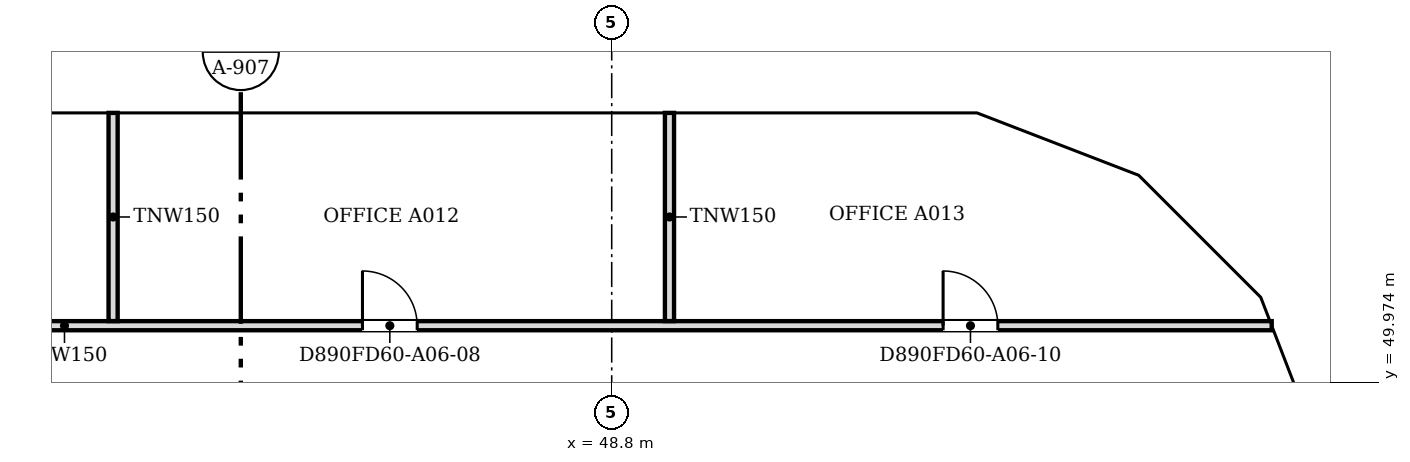
"""IFC4 building model, lengths in metres.
Left out: names, types, materials, properties, quantities, classifications, styles, units other than length and angle.
Written with IfcOpenShell. Run it as: python <this file> out.ifc"""

import sys

from ifc_helpers import new_model, si_unit, direction, frame, frame_2d, origin, place, context, subcontext, project, spatial, polyline, rectangle, outline, extrude, faceted_brep, source, transform, mapped, element, fill, save


model = new_model("IFC4")
c1 = context("Model", 3, precision=1e-05, world=origin(), true_north=direction((0.0, 1.0)))
c2 = subcontext(c1, "Body", "Model", "MODEL_VIEW")
j1 = project(units=[si_unit("LENGTHUNIT", "METRE"), si_unit("PLANEANGLEUNIT", "RADIAN")], contexts=[c1])
p1 = place(None, origin())
s1 = spatial("IfcSite", under=j1, at=p1, CompositionType="ELEMENT")
p2 = place(p1, origin())
s2 = spatial("IfcBuilding", under=s1, at=p2, CompositionType="ELEMENT")
p3 = place(p2, frame((0.0, 0.0, 68.6)))
s3 = spatial("IfcBuildingStorey", under=s2, at=p3, CompositionType="ELEMENT", Elevation=68.6)
m1 = source(origin(), c2, "Body", "Brep", [
    faceted_brep([(3.003, -0.25, 3.731), (2.95, -0.25, 3.8), (0.0, -0.25, 0.0), (3.003, -0.25, 0.0), (0.047, 0.25, 0.06), (2.898, 0.25, 3.732), (2.898, 0.25, 0.0), (0.047, 0.25, 0.0), (2.95, 0.0, 3.8), (0.0, 0.0, 0.0)], [[[0, 1, 2, 3]], [[4, 5, 6, 7]], [[8, 1, 0]], [[5, 4, 9, 2, 1, 8]], [[7, 6, 3, 2, 9]], [[7, 9, 4]], [[3, 6, 5, 8, 0]]]),
])
p4 = place(p3, frame((60.75, 48.753, 0.0), z_axis=(0.0, 0.0, 1.0), x_axis=(-0.35992665181, 0.932980602862, 0.0)))
e1 = element("IfcWall", 1, at=p4, inside=s3, PredefinedType="SOLIDWALL", context=c2, shape_type="MappedRepresentation", body=[
    mapped(m1, transform((0.0, 0.0, 0.0), scale=1.0)),
])
m2 = source(origin(), c2, "Body", "SweptSolid", [
    extrude(outline(polyline([(2.75, 3.135), (0.511, 0.25), (2.75, 0.25), (2.75, 3.135)])), frame((0.0, 0.26, 0.0), z_axis=(0.0, -1.0, 0.0), x_axis=(1.0, 0.0, 0.0)), (0.0, 0.0, 1.0), 0.52),
])
p5 = place(p4, origin())
e2 = element("IfcOpeningElement", 2, at=p5, cuts=e1, PredefinedType="OPENING", context=c2, shape_type="MappedRepresentation", body=[
    mapped(m2, transform((0.0, 0.0, 0.0), scale=1.0)),
])
m3 = source(origin(), c2, "Body", "Brep", [
    faceted_brep([(2.997, -0.25, 0.0), (0.053, -0.25, 3.8), (0.0, -0.25, 3.732), (0.0, -0.25, 0.0), (0.106, 0.25, 3.731), (2.944, 0.25, 0.068), (2.944, 0.25, 0.0), (0.106, 0.25, 0.0), (0.053, 0.0, 3.8), (2.997, 0.0, 0.0)], [[[0, 1, 2, 3]], [[4, 5, 6, 7]], [[5, 4, 8, 1, 0, 9]], [[2, 1, 8]], [[7, 6, 9, 0, 3]], [[7, 3, 2, 8, 4]], [[9, 6, 5]]]),
])
p6 = place(p3, frame((59.726, 51.469, 0.0), z_axis=(0.0, 0.0, 1.0), x_axis=(-0.707106781187, 0.707106781187, 0.0)))
e3 = element("IfcWall", 3, at=p6, inside=s3, PredefinedType="SOLIDWALL", context=c2, shape_type="MappedRepresentation", body=[
    mapped(m3, transform((0.0, 0.0, 0.0), scale=1.0)),
])
m4 = source(origin(), c2, "Body", "SweptSolid", [
    extrude(outline(polyline([(2.487, 0.25), (0.253, 3.134), (0.253, 0.25), (2.487, 0.25)])), frame((0.0, 0.26, 0.0), z_axis=(0.0, -1.0, 0.0), x_axis=(1.0, 0.0, 0.0)), (0.0, 0.0, 1.0), 0.52),
])
p7 = place(p6, origin())
e4 = element("IfcOpeningElement", 4, at=p7, cuts=e3, PredefinedType="OPENING", context=c2, shape_type="MappedRepresentation", body=[
    mapped(m4, transform((0.0, 0.0, 0.0), scale=1.0)),
])
m5 = source(origin(), c2, "Body", "Brep", [
    faceted_brep([(2.997, -0.25, 3.741), (2.95, -0.25, 3.8), (0.0, -0.25, 0.0), (2.997, -0.25, 0.0), (0.053, 0.25, 0.068), (2.904, 0.25, 3.74), (2.904, 0.25, 0.0), (0.053, 0.25, 0.0), (2.95, 0.0, 3.8), (0.0, 0.0, 0.0)], [[[0, 1, 2, 3]], [[4, 5, 6, 7]], [[8, 1, 0]], [[5, 4, 9, 2, 1, 8]], [[7, 6, 3, 2, 9]], [[7, 9, 4]], [[3, 6, 5, 8, 0]]]),
])
p8 = place(p3, frame((57.606, 53.588, 0.0), z_axis=(0.0, 0.0, 1.0), x_axis=(-0.932990326376, 0.359901446078, 0.0)))
e5 = element("IfcWall", 5, at=p8, inside=s3, PredefinedType="SOLIDWALL", context=c2, shape_type="MappedRepresentation", body=[
    mapped(m5, transform((0.0, 0.0, 0.0), scale=1.0)),
])
p9 = place(p8, origin())
e6 = element("IfcOpeningElement", 6, at=p9, cuts=e5, PredefinedType="OPENING", context=c2, shape_type="MappedRepresentation", body=[
    mapped(m2, transform((0.0, 0.0, 0.0), scale=1.0)),
])
m6 = source(origin(), c2, "Body", "Brep", [
    faceted_brep([(3.05, -0.25, 0.0), (0.047, -0.25, 3.8), (0.0, -0.25, 3.74), (0.0, -0.25, 0.0), (0.093, 0.25, 3.741), (3.05, 0.25, 0.0), (0.093, 0.25, 0.0), (0.047, 0.0, 3.8)], [[[0, 1, 2, 3]], [[4, 5, 6]], [[5, 4, 7, 1, 0]], [[2, 1, 7]], [[6, 5, 0, 3]], [[6, 3, 2, 7, 4]]]),
])
p10 = place(p3, frame((54.9, 54.65, 0.0), z_axis=(0.0, 0.0, 1.0), x_axis=(-1.0, 0.0, 0.0)))
e7 = element("IfcWall", 7, at=p10, inside=s3, PredefinedType="SOLIDWALL", context=c2, shape_type="MappedRepresentation", body=[
    mapped(m6, transform((0.0, 0.0, 0.0), scale=1.0)),
])
m7 = source(origin(), c2, "Body", "SweptSolid", [
    extrude(outline(polyline([(2.534, 0.25), (0.247, 3.144), (0.247, 0.25), (2.534, 0.25)])), frame((0.0, 0.26, 0.0), z_axis=(0.0, -1.0, 0.0), x_axis=(1.0, 0.0, 0.0)), (0.0, 0.0, 1.0), 0.52),
])
p11 = place(p10, origin())
e8 = element("IfcOpeningElement", 8, at=p11, cuts=e7, PredefinedType="OPENING", context=c2, shape_type="MappedRepresentation", body=[
    mapped(m7, transform((0.0, 0.0, 0.0), scale=1.0)),
])
m8 = source(origin(), c2, "Body", "SweptSolid", [
    extrude(outline(polyline([(6.1, 0.0), (3.05, 3.8), (0.0, 0.0), (6.1, 0.0)])), frame((0.0, 0.25, 0.0), z_axis=(0.0, -1.0, 0.0), x_axis=(1.0, 0.0, 0.0)), (0.0, 0.0, 1.0), 0.5),
])
p12 = place(p3, frame((51.85, 54.65, 0.0), z_axis=(0.0, 0.0, 1.0), x_axis=(-1.0, 0.0, 0.0)))
e9 = element("IfcWall", 9, at=p12, inside=s3, PredefinedType="SOLIDWALL", context=c2, shape_type="MappedRepresentation", body=[
    mapped(m8, transform((0.0, 0.0, 0.0), scale=1.0)),
])
m9 = source(origin(), c2, "Body", "SweptSolid", [
    extrude(outline(polyline([(5.579, 0.25), (3.05, 3.4), (0.521, 0.25), (5.579, 0.25)])), frame((0.0, 0.26, 0.0), z_axis=(0.0, -1.0, 0.0), x_axis=(1.0, 0.0, 0.0)), (0.0, 0.0, 1.0), 0.52),
])
p13 = place(p12, origin())
e10 = element("IfcOpeningElement", 10, at=p13, cuts=e9, PredefinedType="OPENING", context=c2, shape_type="MappedRepresentation", body=[
    mapped(m9, transform((0.0, 0.0, 0.0), scale=1.0)),
])
p14 = place(p3, frame((45.75, 54.65, 0.0), z_axis=(0.0, 0.0, 1.0), x_axis=(-1.0, 0.0, 0.0)))
e11 = element("IfcWall", 11, at=p14, inside=s3, PredefinedType="SOLIDWALL", context=c2, shape_type="MappedRepresentation", body=[
    mapped(m8, transform((0.0, 0.0, 0.0), scale=1.0)),
])
p15 = place(p14, origin())
e12 = element("IfcOpeningElement", 12, at=p15, cuts=e11, PredefinedType="OPENING", context=c2, shape_type="MappedRepresentation", body=[
    mapped(m9, transform((0.0, 0.0, 0.0), scale=1.0)),
])
m10 = source(origin(), c2, "Body", "Brep", [
    faceted_brep([(6.1, -0.25, 0.0), (3.05, -0.25, 3.8), (0.0, -0.25, 0.0), (6.1, -0.25, 0.0), (0.0, 0.25, 0.0), (3.05, 0.25, 3.8), (6.1, 0.25, 0.0), (6.1, 0.25, 0.0)], [[[0, 1, 2, 3]], [[4, 5, 6, 7]], [[6, 5, 1, 0]], [[5, 4, 2, 1]], [[4, 7, 3, 2]], [[3, 7, 6, 0]]]),
])
p16 = place(p3, frame((39.65, 54.65, 0.0), z_axis=(0.0, 0.0, 1.0), x_axis=(-1.0, 0.0, 0.0)))
e13 = element("IfcWall", 13, at=p16, inside=s3, PredefinedType="SOLIDWALL", context=c2, shape_type="MappedRepresentation", body=[
    mapped(m10, transform((0.0, 0.0, 0.0), scale=1.0)),
])
p17 = place(p16, origin())
e14 = element("IfcOpeningElement", 14, at=p17, cuts=e13, PredefinedType="OPENING", context=c2, shape_type="MappedRepresentation", body=[
    mapped(m9, transform((0.0, 0.0, 0.0), scale=1.0)),
])
p18 = place(p2, frame((0.0, 0.0, 72.4)))
s4 = spatial("IfcBuildingStorey", under=s2, at=p18, CompositionType="ELEMENT", Elevation=72.4)
m11 = source(origin(), c2, "Body", "Brep", [
    faceted_brep([(0.047, -0.25, 0.0), (2.997, -0.25, 3.8), (0.047, -0.25, 7.6), (0.0, -0.25, 7.541), (0.0, -0.25, 0.059), (0.093, 0.25, 7.54), (2.944, 0.25, 3.868), (2.944, 0.25, 3.732), (0.093, 0.25, 0.06), (2.997, 0.0, 3.8), (0.047, 0.0, 0.0), (0.047, 0.0, 7.6)], [[[0, 1, 2, 3, 4]], [[5, 6, 7, 8]], [[8, 7, 9, 1, 0, 10]], [[6, 5, 11, 2, 1, 9]], [[3, 2, 11]], [[10, 0, 4]], [[8, 10, 4, 3, 11, 5]], [[9, 7, 6]]]),
])
p19 = place(p18, frame((60.767, 48.71, -3.8), z_axis=(0.0, 0.0, 1.0), x_axis=(-0.359901446078, 0.932990326376, 0.0)))
e15 = element("IfcWall", 15, at=p19, inside=s4, PredefinedType="SOLIDWALL", context=c2, shape_type="MappedRepresentation", body=[
    mapped(m11, transform((0.0, 0.0, 0.0), scale=1.0)),
])
m12 = source(origin(), c2, "Body", "SweptSolid", [
    extrude(outline(polyline([(0.247, 0.665), (2.681, 3.8), (0.247, 6.935), (0.247, 0.665)])), frame((0.0, 0.26, 0.0), z_axis=(0.0, -1.0, 0.0), x_axis=(1.0, 0.0, 0.0)), (0.0, 0.0, 1.0), 0.52),
])
p20 = place(p19, origin())
e16 = element("IfcOpeningElement", 16, at=p20, cuts=e15, PredefinedType="OPENING", context=c2, shape_type="MappedRepresentation", body=[
    mapped(m12, transform((0.0, 0.0, 0.0), scale=1.0)),
])
m13 = source(origin(), c2, "Body", "Brep", [
    faceted_brep([(2.944, -0.25, 0.0), (2.997, -0.25, 0.068), (2.997, -0.25, 7.532), (2.944, -0.25, 7.6), (0.0, -0.25, 3.8), (0.053, 0.25, 3.868), (2.891, 0.25, 7.532), (2.891, 0.25, 0.068), (0.053, 0.25, 3.731), (2.944, 0.0, 0.0), (2.944, 0.0, 7.6), (0.0, 0.0, 3.8)], [[[0, 1, 2, 3, 4]], [[5, 6, 7, 8]], [[1, 0, 9]], [[10, 3, 2]], [[6, 5, 11, 4, 3, 10]], [[8, 7, 9, 0, 4, 11]], [[8, 11, 5]], [[1, 9, 7, 6, 10, 2]]]),
])
p21 = place(p18, frame((59.688, 51.506, -3.8), z_axis=(0.0, 0.0, 1.0), x_axis=(-0.707106781187, 0.707106781187, 0.0)))
e17 = element("IfcWall", 17, at=p21, inside=s4, PredefinedType="SOLIDWALL", context=c2, shape_type="MappedRepresentation", body=[
    mapped(m13, transform((0.0, 0.0, 0.0), scale=1.0)),
])
m14 = source(origin(), c2, "Body", "SweptSolid", [
    extrude(outline(polyline([(2.744, 6.934), (0.316, 3.8), (2.744, 0.666), (2.744, 6.934)])), frame((0.0, 0.26, 0.0), z_axis=(0.0, -1.0, 0.0), x_axis=(1.0, 0.0, 0.0)), (0.0, 0.0, 1.0), 0.52),
])
p22 = place(p21, origin())
e18 = element("IfcOpeningElement", 18, at=p22, cuts=e17, PredefinedType="OPENING", context=c2, shape_type="MappedRepresentation", body=[
    mapped(m14, transform((0.0, 0.0, 0.0), scale=1.0)),
])
m15 = source(origin(), c2, "Body", "Brep", [
    faceted_brep([(0.053, -0.25, 0.0), (3.003, -0.25, 3.8), (0.053, -0.25, 7.6), (0.0, -0.25, 7.531), (0.0, -0.25, 0.068), (0.106, 0.25, 7.532), (2.957, 0.25, 3.86), (2.957, 0.25, 3.74), (0.106, 0.25, 0.068), (3.003, 0.0, 3.8), (0.053, 0.0, 0.0), (0.053, 0.0, 7.6)], [[[0, 1, 2, 3, 4]], [[5, 6, 7, 8]], [[8, 7, 9, 1, 0, 10]], [[6, 5, 11, 2, 1, 9]], [[3, 2, 11]], [[10, 0, 4]], [[8, 10, 4, 3, 11, 5]], [[9, 7, 6]]]),
])
p23 = place(p18, frame((57.656, 53.569, -3.8), z_axis=(0.0, 0.0, 1.0), x_axis=(-0.933007896601, 0.359855894603, 0.0)))
e19 = element("IfcWall", 19, at=p23, inside=s4, PredefinedType="SOLIDWALL", context=c2, shape_type="MappedRepresentation", body=[
    mapped(m15, transform((0.0, 0.0, 0.0), scale=1.0)),
])
m16 = source(origin(), c2, "Body", "SweptSolid", [
    extrude(outline(polyline([(0.253, 0.665), (2.687, 3.8), (0.253, 6.935), (0.253, 0.665)])), frame((0.0, 0.26, 0.0), z_axis=(0.0, -1.0, 0.0), x_axis=(1.0, 0.0, 0.0)), (0.0, 0.0, 1.0), 0.52),
])
p24 = place(p23, origin())
e20 = element("IfcOpeningElement", 20, at=p24, cuts=e19, PredefinedType="OPENING", context=c2, shape_type="MappedRepresentation", body=[
    mapped(m16, transform((0.0, 0.0, 0.0), scale=1.0)),
])
m17 = source(origin(), c2, "Body", "Brep", [
    faceted_brep([(3.003, -0.25, 0.0), (6.053, -0.25, 3.8), (3.003, -0.25, 7.6), (0.0, -0.25, 3.8), (0.047, 0.25, 3.859), (3.003, 0.25, 7.6), (6.053, 0.25, 3.8), (3.003, 0.25, 0.0), (0.047, 0.25, 3.741), (0.0, 0.0, 3.8)], [[[0, 1, 2, 3]], [[4, 5, 6, 7, 8]], [[7, 6, 1, 0]], [[6, 5, 2, 1]], [[5, 4, 9, 3, 2]], [[8, 7, 0, 3, 9]], [[8, 9, 4]]]),
])
p25 = place(p18, frame((54.854, 54.65, -3.8), z_axis=(0.0, 0.0, 1.0), x_axis=(-1.0, 0.0, 0.0)))
e21 = element("IfcWall", 21, at=p25, inside=s4, PredefinedType="SOLIDWALL", context=c2, shape_type="MappedRepresentation", body=[
    mapped(m17, transform((0.0, 0.0, 0.0), scale=1.0)),
])
m18 = source(origin(), c2, "Body", "SweptSolid", [
    extrude(outline(polyline([(3.005, 0.401), (5.733, 3.8), (3.005, 7.199), (0.319, 3.8), (3.005, 0.401)])), frame((0.0, 0.26, 0.0), z_axis=(0.0, -1.0, 0.0), x_axis=(1.0, 0.0, 0.0)), (0.0, 0.0, 1.0), 0.52),
])
p26 = place(p25, origin())
e22 = element("IfcOpeningElement", 22, at=p26, cuts=e21, PredefinedType="OPENING", context=c2, shape_type="MappedRepresentation", body=[
    mapped(m18, transform((0.0, 0.0, 0.0), scale=1.0)),
])
m19 = source(origin(), c2, "Body", "SweptSolid", [
    extrude(outline(polyline([(3.05, 0.0), (6.1, 3.8), (3.05, 7.6), (0.0, 3.8), (3.05, 0.0)])), frame((0.0, 0.25, 0.0), z_axis=(0.0, -1.0, 0.0), x_axis=(1.0, 0.0, 0.0)), (0.0, 0.0, 1.0), 0.5),
])
p27 = place(p18, frame((48.8, 54.65, -3.8), z_axis=(0.0, 0.0, 1.0), x_axis=(-1.0, 0.0, 0.0)))
e23 = element("IfcWall", 23, at=p27, inside=s4, PredefinedType="SOLIDWALL", context=c2, shape_type="MappedRepresentation", body=[
    mapped(m19, transform((0.0, 0.0, 0.0), scale=1.0)),
])
m20 = source(origin(), c2, "Body", "SweptSolid", [
    extrude(outline(polyline([(3.05, 0.399), (5.78, 3.8), (3.05, 7.2), (0.321, 3.8), (3.05, 0.399)])), frame((0.0, 0.26, 0.0), z_axis=(0.0, -1.0, 0.0), x_axis=(1.0, 0.0, 0.0)), (0.0, 0.0, 1.0), 0.52),
])
p28 = place(p27, origin())
e24 = element("IfcOpeningElement", 24, at=p28, cuts=e23, PredefinedType="OPENING", context=c2, shape_type="MappedRepresentation", body=[
    mapped(m20, transform((0.0, 0.0, 0.0), scale=1.0)),
])
m21 = source(origin(), c2, "Body", "Brep", [
    faceted_brep([(3.05, -0.25, 0.0), (6.1, -0.25, 3.8), (6.1, -0.25, 3.8), (3.05, -0.25, 7.6), (0.0, -0.25, 3.8), (0.0, 0.25, 3.8), (3.05, 0.25, 7.6), (6.1, 0.25, 3.8), (6.1, 0.25, 3.8), (3.05, 0.25, 0.0)], [[[0, 1, 2, 3, 4]], [[5, 6, 7, 8, 9]], [[9, 8, 1, 0]], [[7, 6, 3, 2]], [[6, 5, 4, 3]], [[5, 9, 0, 4]], [[1, 8, 7, 2]]]),
])
p29 = place(p18, frame((42.7, 54.65, -3.8), z_axis=(0.0, 0.0, 1.0), x_axis=(-1.0, 0.0, 0.0)))
e25 = element("IfcWall", 25, at=p29, inside=s4, PredefinedType="SOLIDWALL", context=c2, shape_type="MappedRepresentation", body=[
    mapped(m21, transform((0.0, 0.0, 0.0), scale=1.0)),
])
p30 = place(p29, origin())
e26 = element("IfcOpeningElement", 26, at=p30, cuts=e25, PredefinedType="OPENING", context=c2, shape_type="MappedRepresentation", body=[
    mapped(m20, transform((0.0, 0.0, 0.0), scale=1.0)),
])
p31 = place(p3, frame((28.4, 50.9, 0.0), z_axis=(0.0, 0.0, 1.0), x_axis=(1.0, 0.0, 0.0)))
e27 = element("IfcWall", 27, at=p31, inside=s3, PredefinedType="PARTITIONING", context=c2, shape_type="SweptSolid", body=[
    extrude(rectangle(XDim=31.254, YDim=0.15, at=frame_2d((15.627, 0.0))), origin(), (0.0, 0.0, 1.0), 3.067),
])
m22 = source(origin(), c2, "Body", "SweptSolid", [
    extrude(rectangle(XDim=0.9, YDim=2.1, at=frame_2d((0.45, 1.05))), frame((0.0, 0.085, 0.0), z_axis=(0.0, -1.0, 0.0), x_axis=(1.0, 0.0, 0.0)), (0.0, 0.0, 1.0), 0.17),
])
p32 = place(p31, frame((16.301, 0.0, 0.0)))
e28 = element("IfcOpeningElement", 28, at=p32, cuts=e27, PredefinedType="OPENING", context=c2, shape_type="MappedRepresentation", body=[
    mapped(m22, transform((0.0, 0.0, 0.0), scale=1.0)),
])
p33 = place(p31, frame((25.85, 0.0, 0.0)))
e29 = element("IfcOpeningElement", 29, at=p33, cuts=e27, PredefinedType="OPENING", context=c2, shape_type="MappedRepresentation", body=[
    mapped(m22, transform((0.0, 0.0, 0.0), scale=1.0)),
])
p34 = place(p31, frame((5.6, 0.0, 0.0)))
e30 = element("IfcOpeningElement", 30, at=p34, cuts=e27, PredefinedType="OPENING", context=c2, shape_type="MappedRepresentation", body=[
    mapped(m22, transform((0.0, 0.0, 0.0), scale=1.0)),
])
for number, where, z_axis, x_axis in (
    (31, (40.6, 50.976, 0.0), (0.0, 0.0, 1.0), (0.0, 1.0, 0.0)),
    (32, (49.75, 50.976, 0.0), (0.0, 0.0, 1.0), (0.0, 1.0, 0.0)),
):
    element("IfcWall", number, at=place(p3, frame(where, z_axis=z_axis, x_axis=x_axis)), inside=s3, PredefinedType="PARTITIONING", context=c2, shape_type="SweptSolid", body=[
        extrude(rectangle(XDim=3.424, YDim=0.15, at=frame_2d((1.712, 0.0))), origin(), (0.0, 0.0, 1.0), 3.067),
    ])
m23 = source(origin(), c2, "Body", "SweptSolid", [
    extrude(rectangle(XDim=0.9, YDim=2.1, at=frame_2d((0.45, 1.05))), frame((0.0, 0.025, 0.0), z_axis=(0.0, -1.0, 0.0), x_axis=(1.0, 0.0, 0.0)), (0.0, 0.0, 1.0), 0.05),
])
p35 = place(p32, origin())
e33 = element("IfcDoor", 33, at=p35, inside=s3, OperationType="SINGLE_SWING_LEFT", PredefinedType="DOOR", context=c2, shape_type="MappedRepresentation", body=[
    mapped(m23, transform((0.0, 0.0, 0.0), scale=1.0)),
])
fill(e28, e33)
p36 = place(p33, origin())
e34 = element("IfcDoor", 34, at=p36, inside=s3, OperationType="SINGLE_SWING_LEFT", PredefinedType="DOOR", context=c2, shape_type="MappedRepresentation", body=[
    mapped(m23, transform((0.0, 0.0, 0.0), scale=1.0)),
])
fill(e29, e34)
save(model, sys.argv[1])
